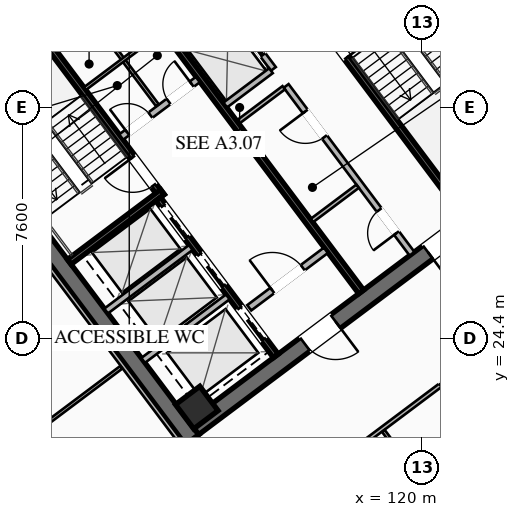
"""IFC4 building model, lengths in metres.
Left out: names, types, materials, properties, quantities, classifications, styles, units other than length and angle.
Written with IfcOpenShell. Run it as: python <this file> out.ifc"""

import sys

from ifc_helpers import new_model, si_unit, direction, frame, frame_2d, origin, origin_2d, place, context, subcontext, project, spatial, rectangle, hollow_rectangle, extrude, element, fill, save


model = new_model("IFC4")
c1 = context("Model", 3, precision=1e-05, world=origin(), true_north=direction((0.0, 1.0)))
c2 = subcontext(c1, "Body", "Model", "MODEL_VIEW")
j1 = project(units=[si_unit("LENGTHUNIT", "METRE"), si_unit("PLANEANGLEUNIT", "RADIAN")], contexts=[c1])
p1 = place(None, origin())
s1 = spatial("IfcSite", under=j1, at=p1, CompositionType="ELEMENT")
p2 = place(p1, origin())
s2 = spatial("IfcBuilding", under=s1, at=p2, CompositionType="ELEMENT")
p3 = place(p2, frame((0.0, 0.0, 117.95)))
s3 = spatial("IfcBuildingStorey", under=s2, at=p3, CompositionType="ELEMENT", Elevation=117.95)
for number, where, z_axis, x_axis in (
    (1, (112.436, 21.077, 0.0), (0.0, 0.0, 1.0), (-0.6, 0.8, 0.0)),
    (2, (115.564, 42.923, 0.0), (0.0, 0.0, 1.0), (0.6, -0.8, 0.0)),
):
    element("IfcWall", number, at=place(p3, frame(where, z_axis=z_axis, x_axis=x_axis)), inside=s3, PredefinedType="SHEAR", context=c2, shape_type="SweptSolid", body=[
        extrude(rectangle(XDim=15.6, YDim=0.55, at=frame_2d((7.8, 0.0))), origin(), (0.0, 0.0, 1.0), 3.55),
    ])
p4 = place(p3, frame((124.539, 30.498, 0.0), z_axis=(0.0, 0.0, 1.0), x_axis=(-0.799998054672, -0.600002593761, 0.0)))
e3 = element("IfcWall", 3, at=p4, inside=s3, PredefinedType="SHEAR", context=c2, shape_type="SweptSolid", body=[
    extrude(rectangle(XDim=15.06, YDim=0.55, at=frame_2d((7.53, 0.0))), origin(), (0.0, 0.0, 1.0), 3.55),
])
p5 = place(p4, frame((9.23, 0.0, 0.0)))
e4 = element("IfcOpeningElement", 4, at=p5, cuts=e3, PredefinedType="OPENING", context=c2, shape_type="SweptSolid", body=[
    extrude(rectangle(XDim=1.25, YDim=2.25, at=frame_2d((0.625, 1.125))), frame((0.0, 0.285, 0.0), z_axis=(0.0, -1.0, 0.0), x_axis=(1.0, 0.0, 0.0)), (0.0, 0.0, 1.0), 0.57),
])
p6 = place(p4, frame((4.18, 0.0, 0.0)))
e5 = element("IfcOpeningElement", 5, at=p6, cuts=e3, PredefinedType="OPENING", context=c2, shape_type="SweptSolid", body=[
    extrude(rectangle(XDim=1.25, YDim=2.25, at=frame_2d((0.625, 1.125))), frame((0.0, 0.285, 0.0), z_axis=(0.0, -1.0, 0.0), x_axis=(1.0, 0.0, 0.0)), (0.0, 0.0, 1.0), 0.57),
])
p7 = place(p3, frame((103.461, 33.502, 0.0), z_axis=(0.0, 0.0, 1.0), x_axis=(0.799998054672, 0.600002593761, 0.0)))
e6 = element("IfcWall", 6, at=p7, inside=s3, PredefinedType="SHEAR", context=c2, shape_type="SweptSolid", body=[
    extrude(rectangle(XDim=15.06, YDim=0.55, at=frame_2d((7.53, 0.0))), origin(), (0.0, 0.0, 1.0), 3.55),
])
p8 = place(p7, frame((4.58, 0.0, 0.0)))
e7 = element("IfcOpeningElement", 7, at=p8, cuts=e6, PredefinedType="OPENING", context=c2, shape_type="SweptSolid", body=[
    extrude(rectangle(XDim=1.25, YDim=2.25, at=frame_2d((0.625, 1.125))), frame((0.0, 0.285, 0.0), z_axis=(0.0, -1.0, 0.0), x_axis=(1.0, 0.0, 0.0)), (0.0, 0.0, 1.0), 0.57),
])
p9 = place(p7, frame((9.63, 0.0, 0.0)))
e8 = element("IfcOpeningElement", 8, at=p9, cuts=e6, PredefinedType="OPENING", context=c2, shape_type="SweptSolid", body=[
    extrude(rectangle(XDim=1.25, YDim=2.25, at=frame_2d((0.625, 1.125))), frame((0.0, 0.285, 0.0), z_axis=(0.0, -1.0, 0.0), x_axis=(1.0, 0.0, 0.0)), (0.0, 0.0, 1.0), 0.57),
])
p10 = place(p3, frame((112.59, 22.13, 0.0), z_axis=(0.0, 0.0, 1.0), x_axis=(0.799999996291, 0.600000004945, 0.0)))
e9 = element("IfcColumn", 9, at=p10, inside=s3, PredefinedType="COLUMN", context=c2, shape_type="SweptSolid", body=[
    extrude(hollow_rectangle(XDim=1.0, YDim=1.0, WallThickness=0.04, at=origin_2d()), origin(), (0.0, 0.0, 1.0), 3.37),
])
p11 = place(p3, frame((111.44, 29.08, 0.0), z_axis=(0.0, 0.0, 1.0), x_axis=(-0.59999029481, 0.8000072788, 0.0)))
e10 = element("IfcWall", 10, at=p11, inside=s3, PredefinedType="SHEAR", context=c2, shape_type="SweptSolid", body=[
    extrude(rectangle(XDim=8.05, YDim=0.2, at=frame_2d((4.025, 0.0))), origin(), (0.0, 0.0, 1.0), 3.37),
])
p12 = place(p11, frame((0.45, 0.0, 0.0)))
e11 = element("IfcOpeningElement", 11, at=p12, cuts=e10, PredefinedType="OPENING", context=c2, shape_type="SweptSolid", body=[
    extrude(rectangle(XDim=1.15, YDim=2.2, at=frame_2d((0.575, 1.1))), frame((0.0, 0.11, 0.0), z_axis=(0.0, -1.0, 0.0), x_axis=(1.0, 0.0, 0.0)), (0.0, 0.0, 1.0), 0.22),
])
p13 = place(p3, frame((108.396, 26.922, 0.0), z_axis=(0.0, 0.0, 1.0), x_axis=(0.800015298837, 0.599979601008, 0.0)))
e12 = element("IfcWall", 12, at=p13, inside=s3, PredefinedType="SHEAR", context=c2, shape_type="SweptSolid", body=[
    extrude(rectangle(XDim=3.83, YDim=0.2, at=frame_2d((1.915, 0.0))), origin(), (0.0, 0.0, 1.0), 3.37),
])
p14 = place(p3, frame((116.56, 34.92, 0.0), z_axis=(0.0, 0.0, 1.0), x_axis=(0.59999029481, -0.8000072788, 0.0)))
e13 = element("IfcWall", 13, at=p14, inside=s3, PredefinedType="SHEAR", context=c2, shape_type="SweptSolid", body=[
    extrude(rectangle(XDim=8.05, YDim=0.2, at=frame_2d((4.025, 0.0))), origin(), (0.0, 0.0, 1.0), 3.37),
])
p15 = place(p14, frame((0.45, 0.0, 0.0)))
e14 = element("IfcOpeningElement", 14, at=p15, cuts=e13, PredefinedType="OPENING", context=c2, shape_type="SweptSolid", body=[
    extrude(rectangle(XDim=1.15, YDim=2.2, at=frame_2d((0.575, 1.1))), frame((0.0, 0.11, 0.0), z_axis=(0.0, -1.0, 0.0), x_axis=(1.0, 0.0, 0.0)), (0.0, 0.0, 1.0), 0.22),
])
p16 = place(p3, frame((117.998, 25.936, 0.0), z_axis=(0.0, 0.0, 1.0), x_axis=(-0.600002693989, 0.799997979501, 0.0)))
e15 = element("IfcWall", 15, at=p16, inside=s3, PredefinedType="SHEAR", context=c2, shape_type="SweptSolid", body=[
    extrude(rectangle(XDim=14.5, YDim=0.2, at=frame_2d((7.25, 0.0))), origin(), (0.0, 0.0, 1.0), 3.37),
])
p17 = place(p3, frame((110.104, 31.028, 0.0), z_axis=(0.0, 0.0, 1.0), x_axis=(0.800018601094, 0.59997519774, 0.0)))
e16 = element("IfcWall", 16, at=p17, inside=s3, PredefinedType="SOLIDWALL", context=c2, shape_type="SweptSolid", body=[
    extrude(rectangle(XDim=3.15, YDim=0.22, at=frame_2d((1.575, 0.0))), origin(), (0.0, 0.0, 1.0), 2.723),
])
p18 = place(p17, frame((0.25, 0.0, 0.0)))
e17 = element("IfcOpeningElement", 17, at=p18, cuts=e16, PredefinedType="OPENING", context=c2, shape_type="SweptSolid", body=[
    extrude(rectangle(XDim=0.95, YDim=2.05, at=frame_2d((0.475, 1.025))), frame((0.0, 0.12, 0.0), z_axis=(0.0, -1.0, 0.0), x_axis=(1.0, 0.0, 0.0)), (0.0, 0.0, 1.0), 0.24),
])
p19 = place(p17, frame((1.95, 0.0, 0.0)))
e18 = element("IfcOpeningElement", 18, at=p19, cuts=e16, PredefinedType="OPENING", context=c2, shape_type="SweptSolid", body=[
    extrude(rectangle(XDim=0.95, YDim=2.05, at=frame_2d((0.475, 1.025))), frame((0.0, 0.12, 0.0), z_axis=(0.0, -1.0, 0.0), x_axis=(1.0, 0.0, 0.0)), (0.0, 0.0, 1.0), 0.24),
])
p20 = place(p3, frame((114.316, 25.412, 0.0), z_axis=(0.0, 0.0, 1.0), x_axis=(0.800018601094, 0.59997519774, 0.0)))
e19 = element("IfcWall", 19, at=p20, inside=s3, PredefinedType="SOLIDWALL", context=c2, shape_type="SweptSolid", body=[
    extrude(rectangle(XDim=3.15, YDim=0.22, at=frame_2d((1.575, 0.0))), origin(), (0.0, 0.0, 1.0), 2.723),
])
p21 = place(p20, frame((0.95, 0.0, 0.0)))
e20 = element("IfcOpeningElement", 20, at=p21, cuts=e19, PredefinedType="OPENING", context=c2, shape_type="SweptSolid", body=[
    extrude(rectangle(XDim=1.25, YDim=2.25, at=frame_2d((0.625, 1.125))), frame((0.0, 0.12, 0.0), z_axis=(0.0, -1.0, 0.0), x_axis=(1.0, 0.0, 0.0)), (0.0, 0.0, 1.0), 0.24),
])
p22 = place(p3, frame((115.19, 23.83, 0.0), z_axis=(0.0, 0.0, 1.0), x_axis=(-0.599993943644, 0.800004542231, 0.0)))
e21 = element("IfcWall", 21, at=p22, inside=s3, PredefinedType="SHEAR", context=c2, shape_type="SweptSolid", body=[
    extrude(rectangle(XDim=6.45, YDim=0.2, at=frame_2d((3.225, 0.0))), origin(), (0.0, 0.0, 1.0), 3.37),
])
p23 = place(p22, frame((4.875, 0.0, 0.0)))
e22 = element("IfcOpeningElement", 22, at=p23, cuts=e21, PredefinedType="OPENING", context=c2, shape_type="SweptSolid", body=[
    extrude(rectangle(XDim=1.3, YDim=2.25, at=frame_2d((0.65, 1.125))), frame((0.0, 0.11, 0.0), z_axis=(0.0, -1.0, 0.0), x_axis=(1.0, 0.0, 0.0)), (0.0, 0.0, 1.0), 0.22),
])
p24 = place(p22, frame((2.875, 0.0, 0.0)))
e23 = element("IfcOpeningElement", 23, at=p24, cuts=e21, PredefinedType="OPENING", context=c2, shape_type="SweptSolid", body=[
    extrude(rectangle(XDim=1.3, YDim=2.25, at=frame_2d((0.65, 1.125))), frame((0.0, 0.11, 0.0), z_axis=(0.0, -1.0, 0.0), x_axis=(1.0, 0.0, 0.0)), (0.0, 0.0, 1.0), 0.22),
])
p25 = place(p22, frame((0.675, 0.0, 0.0)))
e24 = element("IfcOpeningElement", 24, at=p25, cuts=e21, PredefinedType="OPENING", context=c2, shape_type="SweptSolid", body=[
    extrude(rectangle(XDim=1.3, YDim=2.25, at=frame_2d((0.65, 1.125))), frame((0.0, 0.11, 0.0), z_axis=(0.0, -1.0, 0.0), x_axis=(1.0, 0.0, 0.0)), (0.0, 0.0, 1.0), 0.22),
])
for number, where, z_axis, x_axis in (
    (25, (110.826, 23.682, 0.0), (0.0, 0.0, 1.0), (0.8, 0.6, 0.0)),
    (26, (109.608, 25.306, 0.0), (0.0, 0.0, 1.0), (0.8, 0.6, 0.0)),
):
    element("IfcWall", number, at=place(p3, frame(where, z_axis=z_axis, x_axis=x_axis)), inside=s3, PredefinedType="SOLIDWALL", context=c2, shape_type="SweptSolid", body=[
        extrude(rectangle(XDim=3.48, YDim=0.2, at=frame_2d((1.74, 0.0))), origin(), (0.0, 0.0, 1.0), 3.37),
    ])
p26 = place(p3, frame((111.296, 32.072, 0.0), z_axis=(0.0, 0.0, 1.0), x_axis=(-0.59995887973, 0.800030838552, 0.0)))
e27 = element("IfcWall", 27, at=p26, inside=s3, PredefinedType="PARTITIONING", context=c2, shape_type="SweptSolid", body=[
    extrude(rectangle(XDim=3.8, YDim=0.11, at=frame_2d((1.9, 0.0))), origin(), (0.0, 0.0, 1.0), 2.723),
])
p27 = place(p3, frame((108.91, 32.62, 0.0), z_axis=(0.0, 0.0, 1.0), x_axis=(0.800018601094, 0.59997519774, 0.0)))
e28 = element("IfcWall", 28, at=p27, inside=s3, PredefinedType="PARTITIONING", context=c2, shape_type="SweptSolid", body=[
    extrude(rectangle(XDim=3.15, YDim=0.11, at=frame_2d((1.575, 0.0))), origin(), (0.0, 0.0, 1.0), 2.723),
])
p28 = place(p3, frame((119.67, 27.19, 0.0), z_axis=(0.0, 0.0, 1.0), x_axis=(-0.599988677396, 0.800008491828, 0.0)))
e29 = element("IfcWall", 29, at=p28, inside=s3, PredefinedType="SOLIDWALL", context=c2, shape_type="SweptSolid", body=[
    extrude(rectangle(XDim=6.9, YDim=0.2, at=frame_2d((3.45, 0.0))), origin(), (0.0, 0.0, 1.0), 2.723),
])
p29 = place(p28, frame((0.85, 0.0, 0.0)))
e30 = element("IfcOpeningElement", 30, at=p29, cuts=e29, PredefinedType="OPENING", context=c2, shape_type="SweptSolid", body=[
    extrude(rectangle(XDim=0.95, YDim=2.05, at=frame_2d((0.475, 1.025))), frame((0.0, 0.11, 0.0), z_axis=(0.0, -1.0, 0.0), x_axis=(1.0, 0.0, 0.0)), (0.0, 0.0, 1.0), 0.22),
])
p30 = place(p28, frame((4.8, 0.0, 0.0)))
e31 = element("IfcOpeningElement", 31, at=p30, cuts=e29, PredefinedType="OPENING", context=c2, shape_type="SweptSolid", body=[
    extrude(rectangle(XDim=1.05, YDim=2.2, at=frame_2d((0.525, 1.1))), frame((0.0, 0.11, 0.0), z_axis=(0.0, -1.0, 0.0), x_axis=(1.0, 0.0, 0.0)), (0.0, 0.0, 1.0), 0.22),
])
for number, where, z_axis, x_axis in (
    (32, (113.946, 31.522, 0.0), (0.0, 0.0, 1.0), (0.8, 0.6, 0.0)),
    (33, (116.376, 28.282, 0.0), (0.0, 0.0, 1.0), (0.8, 0.6, 0.0)),
):
    element("IfcWall", number, at=place(p3, frame(where, z_axis=z_axis, x_axis=x_axis)), inside=s3, PredefinedType="PARTITIONING", context=c2, shape_type="SweptSolid", body=[
        extrude(rectangle(XDim=1.88, YDim=0.135, at=frame_2d((0.94, 0.0))), origin(), (0.0, 0.0, 1.0), 2.723),
    ])
p31 = place(p3, frame((115.11, 33.27, 0.0), z_axis=(0.0, 0.0, 1.0), x_axis=(-0.600011322243, 0.799991508192, 0.0)))
e34 = element("IfcWall", 34, at=p31, inside=s3, PredefinedType="SOLIDWALL", context=c2, shape_type="SweptSolid", body=[
    extrude(rectangle(XDim=6.9, YDim=0.2, at=frame_2d((3.45, 0.0))), origin(), (0.0, 0.0, 1.0), 3.37),
])
p32 = place(p31, frame((0.575, 0.0, 0.0)))
e35 = element("IfcOpeningElement", 35, at=p32, cuts=e34, PredefinedType="OPENING", context=c2, shape_type="SweptSolid", body=[
    extrude(rectangle(XDim=1.1, YDim=2.2, at=frame_2d((0.55, 1.1))), frame((0.0, 0.11, 0.0), z_axis=(0.0, -1.0, 0.0), x_axis=(1.0, 0.0, 0.0)), (0.0, 0.0, 1.0), 0.22),
])
p33 = place(p31, frame((2.825, 0.0, 0.0)))
e36 = element("IfcOpeningElement", 36, at=p33, cuts=e34, PredefinedType="OPENING", context=c2, shape_type="SweptSolid", body=[
    extrude(rectangle(XDim=1.1, YDim=2.2, at=frame_2d((0.55, 1.1))), frame((0.0, 0.11, 0.0), z_axis=(0.0, -1.0, 0.0), x_axis=(1.0, 0.0, 0.0)), (0.0, 0.0, 1.0), 0.22),
])
p34 = place(p31, frame((5.075, 0.0, 0.0)))
e37 = element("IfcOpeningElement", 37, at=p34, cuts=e34, PredefinedType="OPENING", context=c2, shape_type="SweptSolid", body=[
    extrude(rectangle(XDim=1.1, YDim=2.2, at=frame_2d((0.55, 1.1))), frame((0.0, 0.11, 0.0), z_axis=(0.0, -1.0, 0.0), x_axis=(1.0, 0.0, 0.0)), (0.0, 0.0, 1.0), 0.22),
])
p35 = place(p3, frame((113.526, 32.082, 0.0), z_axis=(0.0, 0.0, 1.0), x_axis=(0.800046745961, 0.599937666993, 0.0)))
e38 = element("IfcWall", 38, at=p35, inside=s3, PredefinedType="SOLIDWALL", context=c2, shape_type="SweptSolid", body=[
    extrude(rectangle(XDim=1.88, YDim=0.2, at=frame_2d((0.94, 0.0))), origin(), (0.0, 0.0, 1.0), 3.37),
])
p36 = place(p3, frame((112.176, 33.882, 0.0), z_axis=(0.0, 0.0, 1.0), x_axis=(0.8, 0.6, 0.0)))
e39 = element("IfcWall", 39, at=p36, inside=s3, PredefinedType="SOLIDWALL", context=c2, shape_type="SweptSolid", body=[
    extrude(rectangle(XDim=1.88, YDim=0.2, at=frame_2d((0.94, 0.0))), origin(), (0.0, 0.0, 1.0), 3.37),
])
p37 = place(p3, frame((95.87, 30.09, 0.0), z_axis=(0.0, 0.0, 1.0), x_axis=(0.799997191971, 0.600003744021, 0.0)))
e40 = element("IfcWall", 40, at=p37, inside=s3, PredefinedType="PARTITIONING", context=c2, shape_type="SweptSolid", body=[
    extrude(rectangle(XDim=31.3, YDim=0.135, at=frame_2d((15.65, 0.0))), origin(), (0.0, 0.0, 1.0), 2.723),
])
p38 = place(p37, frame((0.3, 0.0, 0.0)))
e41 = element("IfcOpeningElement", 41, at=p38, cuts=e40, PredefinedType="OPENING", context=c2, shape_type="SweptSolid", body=[
    extrude(rectangle(XDim=0.95, YDim=2.05, at=frame_2d((0.475, 1.025))), frame((0.0, 0.077, 0.0), z_axis=(0.0, -1.0, 0.0), x_axis=(1.0, 0.0, 0.0)), (0.0, 0.0, 1.0), 0.155),
])
p39 = place(p37, frame((30.05, 0.0, 0.0)))
e42 = element("IfcOpeningElement", 42, at=p39, cuts=e40, PredefinedType="OPENING", context=c2, shape_type="SweptSolid", body=[
    extrude(rectangle(XDim=0.95, YDim=2.05, at=frame_2d((0.475, 1.025))), frame((0.0, 0.077, 0.0), z_axis=(0.0, -1.0, 0.0), x_axis=(1.0, 0.0, 0.0)), (0.0, 0.0, 1.0), 0.155),
])
p40 = place(p3, frame((133.282, 32.374, 0.0), z_axis=(0.0, 0.0, 1.0), x_axis=(-0.8, -0.6, 0.0)))
e43 = element("IfcWall", 43, at=p40, inside=s3, PredefinedType="PARTITIONING", context=c2, shape_type="SweptSolid", body=[
    extrude(rectangle(XDim=31.3, YDim=0.135, at=frame_2d((15.65, 0.0))), origin(), (0.0, 0.0, 1.0), 2.723),
])
p41 = place(p40, frame((29.97, 0.0, 0.0)))
e44 = element("IfcOpeningElement", 44, at=p41, cuts=e43, PredefinedType="OPENING", context=c2, shape_type="SweptSolid", body=[
    extrude(rectangle(XDim=0.95, YDim=2.05, at=frame_2d((0.475, 1.025))), frame((0.0, 0.077, 0.0), z_axis=(0.0, -1.0, 0.0), x_axis=(1.0, 0.0, 0.0)), (0.0, 0.0, 1.0), 0.155),
])
p42 = place(p40, frame((19.151, 0.0, 0.0)))
e45 = element("IfcOpeningElement", 45, at=p42, cuts=e43, PredefinedType="OPENING", context=c2, shape_type="SweptSolid", body=[
    extrude(rectangle(XDim=0.95, YDim=2.05, at=frame_2d((0.475, 1.025))), frame((0.0, 0.077, 0.0), z_axis=(0.0, -1.0, 0.0), x_axis=(1.0, 0.0, 0.0)), (0.0, 0.0, 1.0), 0.155),
])
p43 = place(p40, frame((14.901, 0.0, 0.0)))
e46 = element("IfcOpeningElement", 46, at=p43, cuts=e43, PredefinedType="OPENING", context=c2, shape_type="SweptSolid", body=[
    extrude(rectangle(XDim=0.95, YDim=2.05, at=frame_2d((0.475, 1.025))), frame((0.0, 0.077, 0.0), z_axis=(0.0, -1.0, 0.0), x_axis=(1.0, 0.0, 0.0)), (0.0, 0.0, 1.0), 0.155),
])
p44 = place(p40, frame((10.92, 0.0, 0.0)))
e47 = element("IfcOpeningElement", 47, at=p44, cuts=e43, PredefinedType="OPENING", context=c2, shape_type="SweptSolid", body=[
    extrude(rectangle(XDim=0.95, YDim=2.05, at=frame_2d((0.475, 1.025))), frame((0.0, 0.077, 0.0), z_axis=(0.0, -1.0, 0.0), x_axis=(1.0, 0.0, 0.0)), (0.0, 0.0, 1.0), 0.155),
])
p45 = place(p40, frame((0.38, 0.0, 0.0)))
e48 = element("IfcOpeningElement", 48, at=p45, cuts=e43, PredefinedType="OPENING", context=c2, shape_type="SweptSolid", body=[
    extrude(rectangle(XDim=0.95, YDim=2.05, at=frame_2d((0.475, 1.025))), frame((0.0, 0.077, 0.0), z_axis=(0.0, -1.0, 0.0), x_axis=(1.0, 0.0, 0.0)), (0.0, 0.0, 1.0), 0.155),
])
p46 = place(p3, frame((122.888, 15.816, 0.0), z_axis=(0.0, 0.0, 1.0), x_axis=(-0.599983090003, 0.800012682219, 0.0)))
e49 = element("IfcWall", 49, at=p46, inside=s3, PredefinedType="PARTITIONING", context=c2, shape_type="SweptSolid", body=[
    extrude(rectangle(XDim=6.93, YDim=0.11, at=frame_2d((3.465, 0.0))), origin(), (0.0, 0.0, 1.0), 2.723),
])
p47 = place(p3, frame((112.104, 20.928, 0.0), z_axis=(0.0, 0.0, 1.0), x_axis=(-0.599994940075, 0.800003794918, 0.0)))
e50 = element("IfcWall", 50, at=p47, inside=s3, PredefinedType="PARTITIONING", context=c2, shape_type="SweptSolid", body=[
    extrude(rectangle(XDim=15.44, YDim=0.135, at=frame_2d((7.72, 0.0))), origin(), (0.0, 0.0, 1.0), 2.723),
])
p48 = place(p3, frame((102.076, 17.432, 0.0), z_axis=(0.0, 0.0, 1.0), x_axis=(0.799991245945, 0.600011671896, 0.0)))
e51 = element("IfcWall", 51, at=p48, inside=s3, PredefinedType="PARTITIONING", context=c2, shape_type="SweptSolid", body=[
    extrude(rectangle(XDim=10.04, YDim=0.11, at=frame_2d((5.02, 0.0))), origin(), (0.0, 0.0, 1.0), 2.723),
])
p49 = place(p5, origin())
e52 = element("IfcDoor", 52, at=p49, inside=s3, OperationType="SINGLE_SWING_LEFT", PredefinedType="DOOR", context=c2, shape_type="SweptSolid", body=[
    extrude(rectangle(XDim=1.25, YDim=2.25, at=frame_2d((0.625, 1.125))), frame((0.0, 0.025, 0.0), z_axis=(0.0, -1.0, 0.0), x_axis=(1.0, 0.0, 0.0)), (0.0, 0.0, 1.0), 0.05),
])
fill(e4, e52)
p50 = place(p6, origin())
e53 = element("IfcDoor", 53, at=p50, inside=s3, OperationType="SINGLE_SWING_RIGHT", PredefinedType="DOOR", context=c2, shape_type="SweptSolid", body=[
    extrude(rectangle(XDim=1.25, YDim=2.25, at=frame_2d((0.625, 1.125))), frame((0.0, 0.025, 0.0), z_axis=(0.0, -1.0, 0.0), x_axis=(1.0, 0.0, 0.0)), (0.0, 0.0, 1.0), 0.05),
])
fill(e5, e53)
p51 = place(p12, origin())
e54 = element("IfcDoor", 54, at=p51, inside=s3, OperationType="SINGLE_SWING_RIGHT", PredefinedType="DOOR", context=c2, shape_type="SweptSolid", body=[
    extrude(rectangle(XDim=1.15, YDim=2.2, at=frame_2d((0.575, 1.1))), frame((0.0, 0.025, 0.0), z_axis=(0.0, -1.0, 0.0), x_axis=(1.0, 0.0, 0.0)), (0.0, 0.0, 1.0), 0.05),
])
fill(e11, e54)
p52 = place(p15, origin())
e55 = element("IfcDoor", 55, at=p52, inside=s3, OperationType="SINGLE_SWING_RIGHT", PredefinedType="DOOR", context=c2, shape_type="SweptSolid", body=[
    extrude(rectangle(XDim=1.15, YDim=2.2, at=frame_2d((0.575, 1.1))), frame((0.0, 0.025, 0.0), z_axis=(0.0, -1.0, 0.0), x_axis=(1.0, 0.0, 0.0)), (0.0, 0.0, 1.0), 0.05),
])
fill(e14, e55)
p53 = place(p21, origin())
e56 = element("IfcDoor", 56, at=p53, inside=s3, OperationType="SINGLE_SWING_LEFT", PredefinedType="DOOR", context=c2, shape_type="SweptSolid", body=[
    extrude(rectangle(XDim=1.25, YDim=2.25, at=frame_2d((0.625, 1.125))), frame((0.0, 0.025, 0.0), z_axis=(0.0, -1.0, 0.0), x_axis=(1.0, 0.0, 0.0)), (0.0, 0.0, 1.0), 0.05),
])
fill(e20, e56)
p54 = place(p18, origin())
e57 = element("IfcDoor", 57, at=p54, inside=s3, OperationType="SINGLE_SWING_LEFT", PredefinedType="DOOR", context=c2, shape_type="SweptSolid", body=[
    extrude(rectangle(XDim=0.95, YDim=2.05, at=frame_2d((0.475, 1.025))), frame((0.0, 0.025, 0.0), z_axis=(0.0, -1.0, 0.0), x_axis=(1.0, 0.0, 0.0)), (0.0, 0.0, 1.0), 0.05),
])
fill(e17, e57)
p55 = place(p19, origin())
e58 = element("IfcDoor", 58, at=p55, inside=s3, OperationType="SINGLE_SWING_RIGHT", PredefinedType="DOOR", context=c2, shape_type="SweptSolid", body=[
    extrude(rectangle(XDim=0.95, YDim=2.05, at=frame_2d((0.475, 1.025))), frame((0.0, 0.025, 0.0), z_axis=(0.0, -1.0, 0.0), x_axis=(1.0, 0.0, 0.0)), (0.0, 0.0, 1.0), 0.05),
])
fill(e18, e58)
p56 = place(p29, origin())
e59 = element("IfcDoor", 59, at=p56, inside=s3, OperationType="SINGLE_SWING_LEFT", PredefinedType="DOOR", context=c2, shape_type="SweptSolid", body=[
    extrude(rectangle(XDim=0.95, YDim=2.05, at=frame_2d((0.475, 1.025))), frame((0.0, 0.025, 0.0), z_axis=(0.0, -1.0, 0.0), x_axis=(1.0, 0.0, 0.0)), (0.0, 0.0, 1.0), 0.05),
])
fill(e30, e59)
p57 = place(p30, origin())
e60 = element("IfcDoor", 60, at=p57, inside=s3, OperationType="SINGLE_SWING_RIGHT", PredefinedType="DOOR", context=c2, shape_type="SweptSolid", body=[
    extrude(rectangle(XDim=1.05, YDim=2.2, at=frame_2d((0.525, 1.1))), frame((0.0, 0.025, 0.0), z_axis=(0.0, -1.0, 0.0), x_axis=(1.0, 0.0, 0.0)), (0.0, 0.0, 1.0), 0.05),
])
fill(e31, e60)
p58 = place(p43, origin())
e61 = element("IfcDoor", 61, at=p58, inside=s3, OperationType="SINGLE_SWING_LEFT", PredefinedType="DOOR", context=c2, shape_type="SweptSolid", body=[
    extrude(rectangle(XDim=0.95, YDim=2.05, at=frame_2d((0.475, 1.025))), frame((0.0, 0.025, 0.0), z_axis=(0.0, -1.0, 0.0), x_axis=(1.0, 0.0, 0.0)), (0.0, 0.0, 1.0), 0.05),
])
fill(e46, e61)
p59 = place(p23, origin())
e62 = element("IfcDoor", 62, at=p59, inside=s3, OperationType="SLIDING_TO_LEFT", PredefinedType="DOOR", context=c2, shape_type="SweptSolid", body=[
    extrude(rectangle(XDim=1.3, YDim=2.25, at=frame_2d((0.65, 1.125))), frame((0.0, 0.025, 0.0), z_axis=(0.0, -1.0, 0.0), x_axis=(1.0, 0.0, 0.0)), (0.0, 0.0, 1.0), 0.05),
])
fill(e22, e62)
p60 = place(p24, origin())
e63 = element("IfcDoor", 63, at=p60, inside=s3, OperationType="SLIDING_TO_LEFT", PredefinedType="DOOR", context=c2, shape_type="SweptSolid", body=[
    extrude(rectangle(XDim=1.3, YDim=2.25, at=frame_2d((0.65, 1.125))), frame((0.0, 0.025, 0.0), z_axis=(0.0, -1.0, 0.0), x_axis=(1.0, 0.0, 0.0)), (0.0, 0.0, 1.0), 0.05),
])
fill(e23, e63)
p61 = place(p25, origin())
e64 = element("IfcDoor", 64, at=p61, inside=s3, OperationType="SLIDING_TO_LEFT", PredefinedType="DOOR", context=c2, shape_type="SweptSolid", body=[
    extrude(rectangle(XDim=1.3, YDim=2.25, at=frame_2d((0.65, 1.125))), frame((0.0, 0.025, 0.0), z_axis=(0.0, -1.0, 0.0), x_axis=(1.0, 0.0, 0.0)), (0.0, 0.0, 1.0), 0.05),
])
fill(e24, e64)
p62 = place(p32, origin())
e65 = element("IfcDoor", 65, at=p62, inside=s3, OperationType="SLIDING_TO_LEFT", PredefinedType="DOOR", context=c2, shape_type="SweptSolid", body=[
    extrude(rectangle(XDim=1.1, YDim=2.2, at=frame_2d((0.55, 1.1))), frame((0.0, 0.025, 0.0), z_axis=(0.0, -1.0, 0.0), x_axis=(1.0, 0.0, 0.0)), (0.0, 0.0, 1.0), 0.05),
])
fill(e35, e65)
save(model, sys.argv[1])
